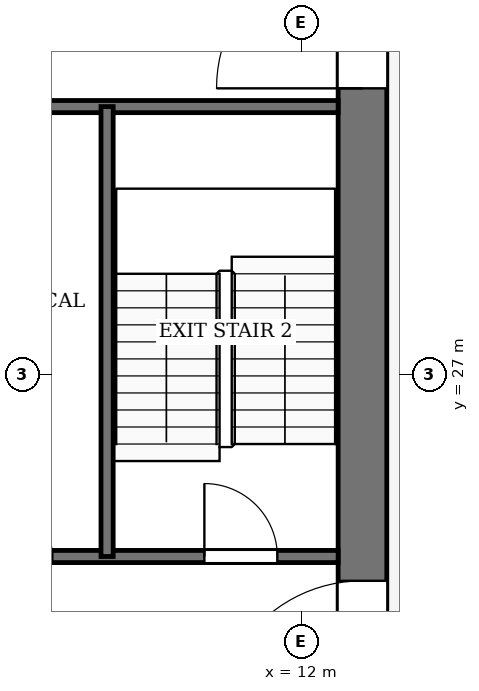
"""IFC4 building model, lengths in metres.
Left out: names, types, materials, properties, quantities, classifications, styles, units other than length and angle.
Written with IfcOpenShell. Run it as: python <this file> out.ifc"""

import sys

from ifc_helpers import new_model, si_unit, direction, frame, frame_2d, origin, place, context, subcontext, project, spatial, rectangle, extrude, element, fill, save


model = new_model("IFC4")
c1 = context("Model", 3, precision=1e-05, world=origin(), true_north=direction((0.0, 1.0)))
c2 = subcontext(c1, "Body", "Model", "MODEL_VIEW")
j1 = project(units=[si_unit("LENGTHUNIT", "METRE"), si_unit("PLANEANGLEUNIT", "RADIAN")], contexts=[c1])
p1 = place(None, origin())
s1 = spatial("IfcSite", under=j1, at=p1, CompositionType="ELEMENT")
p2 = place(p1, origin())
s2 = spatial("IfcBuilding", under=s1, at=p2, CompositionType="ELEMENT")
p3 = place(p2, frame((0.0, 0.0, 262.0)))
s3 = spatial("IfcBuildingStorey", under=s2, at=p3, CompositionType="ELEMENT", Elevation=262.0)
p4 = place(p3, frame((13.0, 18.4, -0.13), z_axis=(0.0, 0.0, 1.0), x_axis=(0.0, 1.0, 0.0)))
e1 = element("IfcWall", 1, at=p4, inside=s3, PredefinedType="SHEAR", context=c2, shape_type="SweptSolid", body=[
    extrude(rectangle(XDim=19.2, YDim=0.8, at=frame_2d((9.6, 0.0))), origin(), (0.0, 0.0, 1.0), 4.0),
])
p5 = place(p4, frame((2.8, 0.0, 0.13)))
e2 = element("IfcOpeningElement", 2, at=p5, cuts=e1, PredefinedType="OPENING", context=c2, shape_type="SweptSolid", body=[
    extrude(rectangle(XDim=2.4, YDim=2.4, at=frame_2d((1.2, 1.2))), frame((0.0, 0.41, 0.0), z_axis=(0.0, -1.0, 0.0), x_axis=(1.0, 0.0, 0.0)), (0.0, 0.0, 1.0), 0.82),
])
p6 = place(p4, frame((13.3, 0.0, 0.13)))
e3 = element("IfcOpeningElement", 3, at=p6, cuts=e1, PredefinedType="OPENING", context=c2, shape_type="SweptSolid", body=[
    extrude(rectangle(XDim=2.4, YDim=2.4, at=frame_2d((1.2, 1.2))), frame((0.0, 0.41, 0.0), z_axis=(0.0, -1.0, 0.0), x_axis=(1.0, 0.0, 0.0)), (0.0, 0.0, 1.0), 0.82),
])
p7 = place(p3, frame((6.0, 24.0, 0.0), z_axis=(0.0, 0.0, 1.0), x_axis=(1.0, 0.0, 0.0)))
e4 = element("IfcWall", 4, at=p7, inside=s3, PredefinedType="PARTITIONING", context=c2, shape_type="SweptSolid", body=[
    extrude(rectangle(XDim=6.6, YDim=0.2, at=frame_2d((3.3, 0.0))), origin(), (0.0, 0.0, 1.0), 3.87),
])
p8 = place(p7, frame((0.9, 0.0, 0.0)))
e5 = element("IfcOpeningElement", 5, at=p8, cuts=e4, PredefinedType="OPENING", context=c2, shape_type="SweptSolid", body=[
    extrude(rectangle(XDim=1.0, YDim=2.1, at=frame_2d((0.5, 1.05))), frame((0.0, 0.11, 0.0), z_axis=(0.0, -1.0, 0.0), x_axis=(1.0, 0.0, 0.0)), (0.0, 0.0, 1.0), 0.22),
])
p9 = place(p7, frame((4.4, 0.0, 0.0)))
e6 = element("IfcOpeningElement", 6, at=p9, cuts=e4, PredefinedType="OPENING", context=c2, shape_type="SweptSolid", body=[
    extrude(rectangle(XDim=1.2, YDim=2.2, at=frame_2d((0.6, 1.1))), frame((0.0, 0.11, 0.0), z_axis=(0.0, -1.0, 0.0), x_axis=(1.0, 0.0, 0.0)), (0.0, 0.0, 1.0), 0.22),
])
p10 = place(p3, frame((6.0, 31.4, 0.0), z_axis=(0.0, 0.0, 1.0), x_axis=(1.0, 0.0, 0.0)))
e7 = element("IfcWall", 7, at=p10, inside=s3, PredefinedType="PARTITIONING", context=c2, shape_type="SweptSolid", body=[
    extrude(rectangle(XDim=6.6, YDim=0.2, at=frame_2d((3.3, 0.0))), origin(), (0.0, 0.0, 1.0), 3.87),
])
p11 = place(p3, frame((8.8, 24.0, 0.0), z_axis=(0.0, 0.0, 1.0), x_axis=(0.0, 1.0, 0.0)))
e8 = element("IfcWall", 8, at=p11, inside=s3, PredefinedType="PARTITIONING", context=c2, shape_type="SweptSolid", body=[
    extrude(rectangle(XDim=7.4, YDim=0.2, at=frame_2d((3.7, 0.0))), origin(), (0.0, 0.0, 1.0), 3.87),
])
p12 = place(p9, origin())
e9 = element("IfcDoor", 9, at=p12, inside=s3, OperationType="SINGLE_SWING_LEFT", PredefinedType="DOOR", context=c2, shape_type="SweptSolid", body=[
    extrude(rectangle(XDim=1.2, YDim=2.2, at=frame_2d((0.6, 1.1))), frame((0.0, 0.025, 0.0), z_axis=(0.0, -1.0, 0.0), x_axis=(1.0, 0.0, 0.0)), (0.0, 0.0, 1.0), 0.05),
])
fill(e6, e9)
p13 = place(p5, origin())
e10 = element("IfcDoor", 10, at=p13, inside=s3, OperationType="DOUBLE_DOOR_SINGLE_SWING", PredefinedType="DOOR", context=c2, shape_type="SweptSolid", body=[
    extrude(rectangle(XDim=2.4, YDim=2.4, at=frame_2d((1.2, 1.2))), frame((0.0, 0.025, 0.0), z_axis=(0.0, -1.0, 0.0), x_axis=(1.0, 0.0, 0.0)), (0.0, 0.0, 1.0), 0.05),
])
fill(e2, e10)
p14 = place(p6, origin())
e11 = element("IfcDoor", 11, at=p14, inside=s3, OperationType="DOUBLE_DOOR_SINGLE_SWING", PredefinedType="DOOR", context=c2, shape_type="SweptSolid", body=[
    extrude(rectangle(XDim=2.4, YDim=2.4, at=frame_2d((1.2, 1.2))), frame((0.0, 0.025, 0.0), z_axis=(0.0, -1.0, 0.0), x_axis=(1.0, 0.0, 0.0)), (0.0, 0.0, 1.0), 0.05),
])
fill(e3, e11)
save(model, sys.argv[1])
